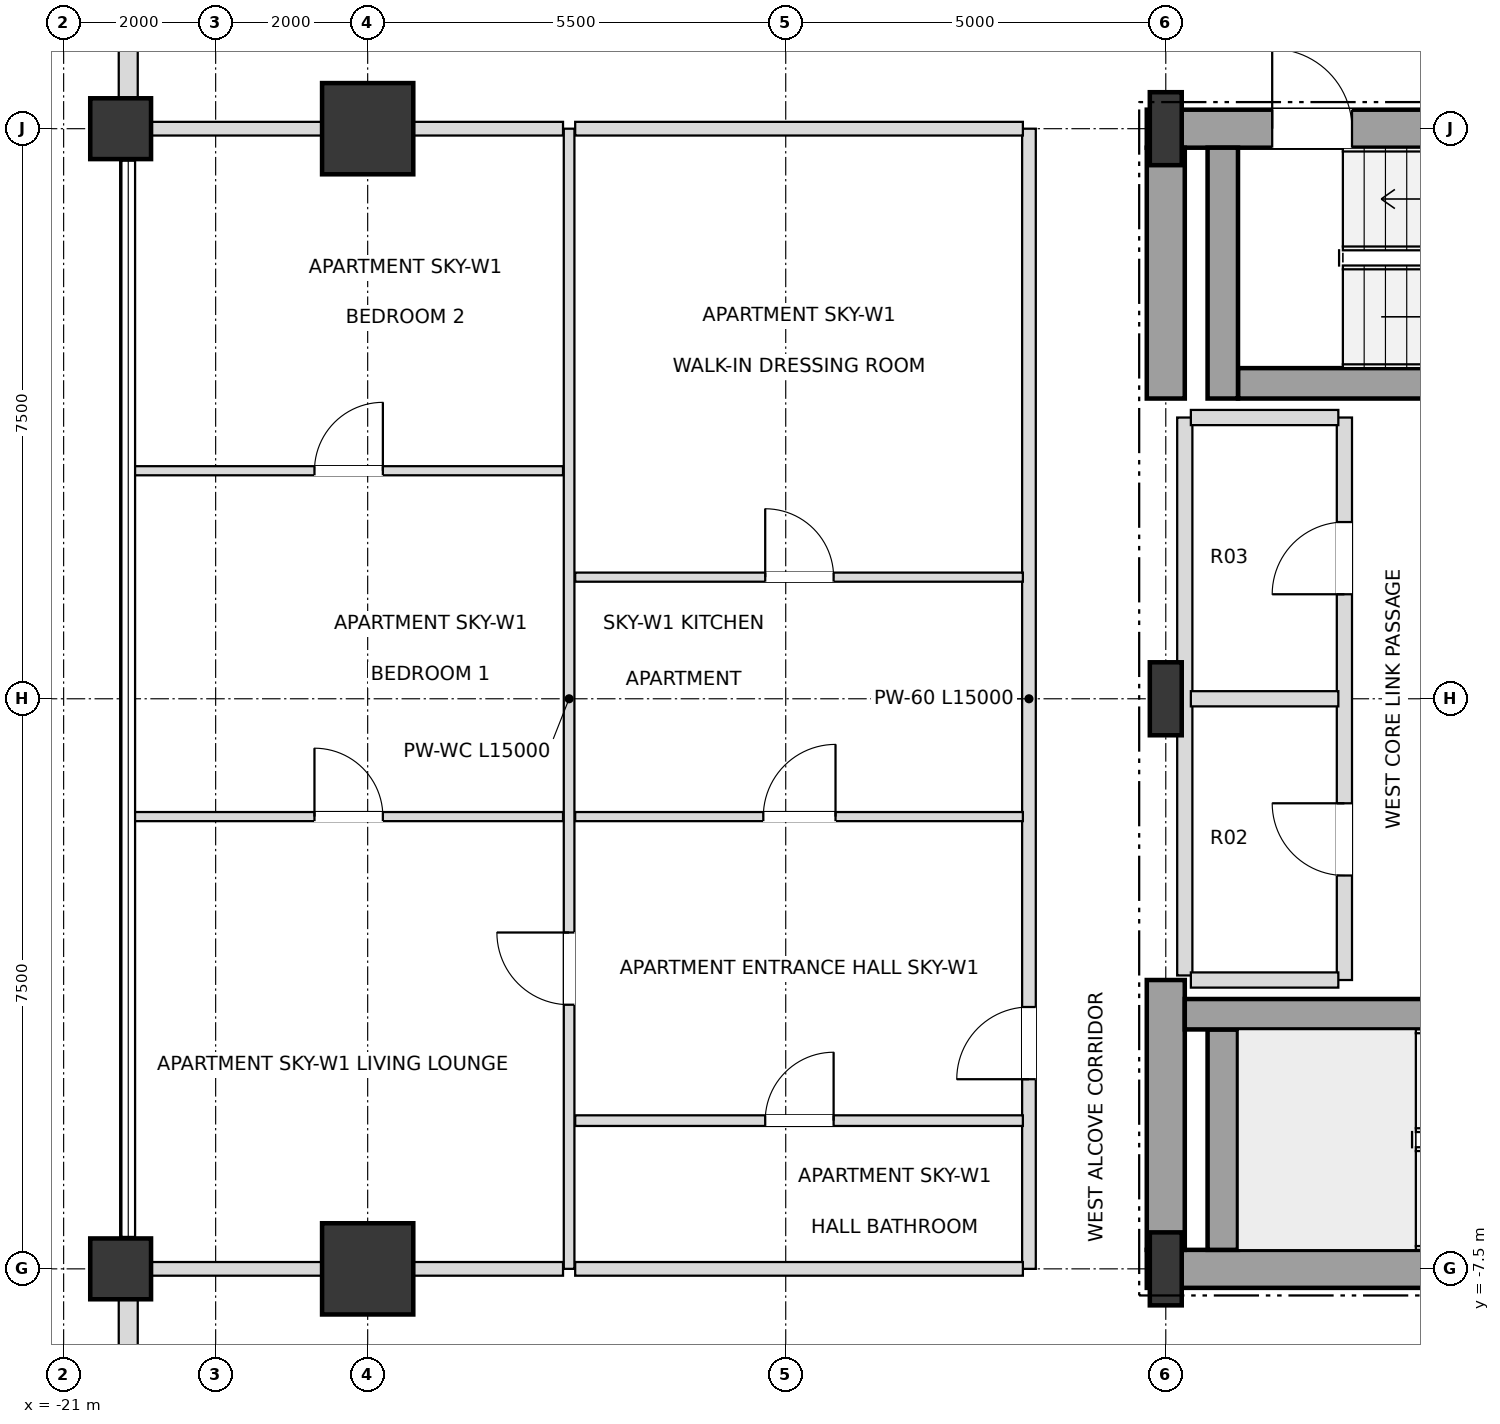
"""IFC4 building model, lengths in metres.
Left out: names, types, materials, properties, quantities, classifications, styles, units other than length and angle.
Written with IfcOpenShell. Run it as: python <this file> out.ifc"""

import sys

from ifc_helpers import new_model, si_unit, direction, frame, frame_2d, origin, origin_2d, place, context, subcontext, project, spatial, rectangle, i_section, extrude, element, fill, save


model = new_model("IFC4")
c1 = context("Model", 3, precision=1e-05, world=origin(), true_north=direction((0.0, 1.0)))
c2 = subcontext(c1, "Body", "Model", "MODEL_VIEW")
j1 = project(units=[si_unit("LENGTHUNIT", "METRE"), si_unit("PLANEANGLEUNIT", "RADIAN")], contexts=[c1])
p1 = place(None, origin())
s1 = spatial("IfcSite", under=j1, at=p1, CompositionType="ELEMENT")
p2 = place(p1, origin())
s2 = spatial("IfcBuilding", under=s1, at=p2, CompositionType="ELEMENT")
p3 = place(p2, frame((0.0, 0.0, 125.1)))
s3 = spatial("IfcBuildingStorey", under=s2, at=p3, CompositionType="ELEMENT", Elevation=125.1)
for number, where, z_axis, x_axis in (
    (1, (-6.5, -7.5, 0.0), (0.0, 0.0, 1.0), (1.0, 0.0, 0.0)),
    (2, (-6.5, 0.0, 0.0), (0.0, 0.0, 1.0), (1.0, 0.0, 0.0)),
    (3, (-6.5, 7.5, 0.0), (0.0, 0.0, 1.0), (1.0, 0.0, 0.0)),
):
    element("IfcColumn", number, at=place(p3, frame(where, z_axis=z_axis, x_axis=x_axis)), inside=s3, PredefinedType="COLUMN", context=c2, shape_type="SweptSolid", body=[
        extrude(i_section(OverallWidth=0.42, OverallDepth=0.96, WebThickness=0.022, FlangeThickness=0.034, at=origin_2d()), origin(), (0.0, 0.0, 1.0), 4.5),
    ])
for number, where, z_axis, x_axis in (
    (4, (-17.0, 7.5, 0.0), (0.0, 0.0, 1.0), (1.0, 0.0, 0.0)),
    (5, (-17.0, -7.5, 0.0), (0.0, 0.0, 1.0), (1.0, 0.0, 0.0)),
):
    element("IfcColumn", number, at=place(p3, frame(where, z_axis=z_axis, x_axis=x_axis)), inside=s3, PredefinedType="USERDEFINED", context=c2, shape_type="SweptSolid", body=[
        extrude(rectangle(XDim=1.2, YDim=1.2, at=origin_2d()), origin(), (0.0, 0.0, 1.0), 4.5),
    ])
for number, where, z_axis, x_axis in (
    (6, (-20.25, -7.5, 0.0), (0.0, 0.0, 1.0), (1.0, 0.0, 0.0)),
    (7, (-20.25, 7.5, 0.0), (0.0, 0.0, 1.0), (1.0, 0.0, 0.0)),
):
    element("IfcColumn", number, at=place(p3, frame(where, z_axis=z_axis, x_axis=x_axis)), inside=s3, PredefinedType="COLUMN", context=c2, shape_type="SweptSolid", body=[
        extrude(rectangle(XDim=0.8, YDim=0.8, at=origin_2d()), origin(), (0.0, 0.0, 1.0), 4.5),
    ])
p4 = place(p3, frame((-20.15, 12.605, 0.0), z_axis=(0.0, 0.0, 1.0), x_axis=(0.0, -1.0, 0.0)))
e8 = element("IfcWall", 8, at=p4, inside=s3, PredefinedType="SOLIDWALL", context=c2, shape_type="SweptSolid", body=[
    extrude(rectangle(XDim=4.71, YDim=0.25, at=frame_2d((2.355, 0.0))), origin(), (0.0, 0.0, 1.0), 3.636),
])
p5 = place(p4, frame((1.455, 0.0, 0.72)))
e9 = element("IfcOpeningElement", 9, at=p5, cuts=e8, PredefinedType="OPENING", context=c2, shape_type="SweptSolid", body=[
    extrude(rectangle(XDim=1.8, YDim=1.68, at=frame_2d((0.9, 0.84))), frame((0.0, 0.135, 0.0), z_axis=(0.0, -1.0, 0.0), x_axis=(1.0, 0.0, 0.0)), (0.0, 0.0, 1.0), 0.27),
])
p6 = place(p3, frame((-20.15, -7.895, 0.0), z_axis=(0.0, 0.0, 1.0), x_axis=(0.0, -1.0, 0.0)))
e10 = element("IfcWall", 10, at=p6, inside=s3, PredefinedType="SOLIDWALL", context=c2, shape_type="SweptSolid", body=[
    extrude(rectangle(XDim=4.71, YDim=0.25, at=frame_2d((2.355, 0.0))), origin(), (0.0, 0.0, 1.0), 3.636),
])
p7 = place(p6, frame((1.455, 0.0, 0.72)))
e11 = element("IfcOpeningElement", 11, at=p7, cuts=e10, PredefinedType="OPENING", context=c2, shape_type="SweptSolid", body=[
    extrude(rectangle(XDim=1.8, YDim=1.68, at=frame_2d((0.9, 0.84))), frame((0.0, 0.135, 0.0), z_axis=(0.0, -1.0, 0.0), x_axis=(1.0, 0.0, 0.0)), (0.0, 0.0, 1.0), 0.27),
])
p8 = place(p3, frame((-6.75, -7.5, 0.0), z_axis=(0.0, 0.0, 1.0), x_axis=(1.0, 0.0, 0.0)))
e12 = element("IfcWall", 12, at=p8, inside=s3, PredefinedType="SHEAR", context=c2, shape_type="SweptSolid", body=[
    extrude(rectangle(XDim=6.75, YDim=0.5, at=frame_2d((3.375, 0.0))), origin(), (0.0, 0.0, 1.0), 4.28),
])
p9 = place(p3, frame((-6.75, 7.5, 0.0), z_axis=(0.0, 0.0, 1.0), x_axis=(1.0, 0.0, 0.0)))
e13 = element("IfcWall", 13, at=p9, inside=s3, PredefinedType="SHEAR", context=c2, shape_type="SweptSolid", body=[
    extrude(rectangle(XDim=6.75, YDim=0.5, at=frame_2d((3.375, 0.0))), origin(), (0.0, 0.0, 1.0), 4.28),
])
p10 = place(p9, frame((1.65, 0.0, 0.0)))
e14 = element("IfcOpeningElement", 14, at=p10, cuts=e13, PredefinedType="OPENING", context=c2, shape_type="SweptSolid", body=[
    extrude(rectangle(XDim=1.05, YDim=2.15, at=frame_2d((0.525, 1.075))), frame((0.0, 0.26, 0.0), z_axis=(0.0, -1.0, 0.0), x_axis=(1.0, 0.0, 0.0)), (0.0, 0.0, 1.0), 0.52),
])
p11 = place(p3, frame((-6.5, -7.25, 0.0), z_axis=(0.0, 0.0, 1.0), x_axis=(0.0, 1.0, 0.0)))
e15 = element("IfcWall", 15, at=p11, inside=s3, PredefinedType="SHEAR", context=c2, shape_type="SweptSolid", body=[
    extrude(rectangle(XDim=3.55, YDim=0.5, at=frame_2d((1.775, 0.0))), origin(), (0.0, 0.0, 1.0), 4.28),
])
p12 = place(p3, frame((-6.5, 3.95, 0.0), z_axis=(0.0, 0.0, 1.0), x_axis=(0.0, 1.0, 0.0)))
e16 = element("IfcWall", 16, at=p12, inside=s3, PredefinedType="SHEAR", context=c2, shape_type="SweptSolid", body=[
    extrude(rectangle(XDim=3.3, YDim=0.5, at=frame_2d((1.65, 0.0))), origin(), (0.0, 0.0, 1.0), 4.28),
])
p13 = place(p3, frame((-5.75, -7.25, 0.0), z_axis=(0.0, 0.0, 1.0), x_axis=(0.0, 1.0, 0.0)))
e17 = element("IfcWall", 17, at=p13, inside=s3, PredefinedType="SHEAR", context=c2, shape_type="SweptSolid", body=[
    extrude(rectangle(XDim=2.9, YDim=0.4, at=frame_2d((1.45, 0.0))), origin(), (0.0, 0.0, 1.0), 4.28),
])
p14 = place(p3, frame((-6.25, -4.15, 0.0), z_axis=(0.0, 0.0, 1.0), x_axis=(1.0, 0.0, 0.0)))
e18 = element("IfcWall", 18, at=p14, inside=s3, PredefinedType="SHEAR", context=c2, shape_type="SweptSolid", body=[
    extrude(rectangle(XDim=7.78, YDim=0.4, at=frame_2d((3.89, 0.0))), origin(), (0.0, 0.0, 1.0), 4.28),
])
p15 = place(p3, frame((-5.55, 4.15, 0.0), z_axis=(0.0, 0.0, 1.0), x_axis=(1.0, 0.0, 0.0)))
e19 = element("IfcWall", 19, at=p15, inside=s3, PredefinedType="SHEAR", context=c2, shape_type="SweptSolid", body=[
    extrude(rectangle(XDim=7.08, YDim=0.4, at=frame_2d((3.54, 0.0))), origin(), (0.0, 0.0, 1.0), 4.28),
])
p16 = place(p3, frame((-5.75, 3.95, 0.0), z_axis=(0.0, 0.0, 1.0), x_axis=(0.0, 1.0, 0.0)))
e20 = element("IfcWall", 20, at=p16, inside=s3, PredefinedType="SHEAR", context=c2, shape_type="SweptSolid", body=[
    extrude(rectangle(XDim=3.3, YDim=0.4, at=frame_2d((1.65, 0.0))), origin(), (0.0, 0.0, 1.0), 4.28),
])
p17 = place(p3, frame((-14.35, -7.5, 0.0), z_axis=(0.0, 0.0, 1.0), x_axis=(0.0, 1.0, 0.0)))
e21 = element("IfcWall", 21, at=p17, inside=s3, PredefinedType="PARTITIONING", context=c2, shape_type="SweptSolid", body=[
    extrude(rectangle(XDim=15.0, YDim=0.14, at=frame_2d((7.5, 0.0))), origin(), (0.0, 0.0, 1.0), 4.28),
])
p18 = place(p17, frame((3.475, 0.0, 0.0)))
e22 = element("IfcOpeningElement", 22, at=p18, cuts=e21, PredefinedType="OPENING", context=c2, shape_type="SweptSolid", body=[
    extrude(rectangle(XDim=0.95, YDim=2.1, at=frame_2d((0.475, 1.05))), frame((0.0, 0.08, 0.0), z_axis=(0.0, -1.0, 0.0), x_axis=(1.0, 0.0, 0.0)), (0.0, 0.0, 1.0), 0.16),
])
p19 = place(p3, frame((-8.3, -7.5, 0.0), z_axis=(0.0, 0.0, 1.0), x_axis=(0.0, 1.0, 0.0)))
e23 = element("IfcWall", 23, at=p19, inside=s3, PredefinedType="PARTITIONING", context=c2, shape_type="SweptSolid", body=[
    extrude(rectangle(XDim=15.0, YDim=0.18, at=frame_2d((7.5, 0.0))), origin(), (0.0, 0.0, 1.0), 4.28),
])
p20 = place(p19, frame((2.495, 0.0, 0.0)))
e24 = element("IfcOpeningElement", 24, at=p20, cuts=e23, PredefinedType="OPENING", context=c2, shape_type="SweptSolid", body=[
    extrude(rectangle(XDim=0.95, YDim=2.15, at=frame_2d((0.475, 1.075))), frame((0.0, 0.1, 0.0), z_axis=(0.0, -1.0, 0.0), x_axis=(1.0, 0.0, 0.0)), (0.0, 0.0, 1.0), 0.2),
])
p21 = place(p3, frame((-6.25, -3.64, 0.0), z_axis=(0.0, 0.0, 1.0), x_axis=(0.0, 1.0, 0.0)))
e25 = element("IfcWall", 25, at=p21, inside=s3, PredefinedType="SOLIDWALL", context=c2, shape_type="SweptSolid", body=[
    extrude(rectangle(XDim=7.34, YDim=0.2, at=frame_2d((3.67, 0.0))), origin(), (0.0, 0.0, 1.0), 4.28),
])
p22 = place(p3, frame((-4.15, -3.7, 0.0), z_axis=(0.0, 0.0, 1.0), x_axis=(0.0, 1.0, 0.0)))
e26 = element("IfcWall", 26, at=p22, inside=s3, PredefinedType="SOLIDWALL", context=c2, shape_type="SweptSolid", body=[
    extrude(rectangle(XDim=7.4, YDim=0.2, at=frame_2d((3.7, 0.0))), origin(), (0.0, 0.0, 1.0), 4.28),
])
p23 = place(p22, frame((1.375, 0.0, 0.0)))
e27 = element("IfcOpeningElement", 27, at=p23, cuts=e26, PredefinedType="OPENING", context=c2, shape_type="SweptSolid", body=[
    extrude(rectangle(XDim=0.95, YDim=2.15, at=frame_2d((0.475, 1.075))), frame((0.0, 0.11, 0.0), z_axis=(0.0, -1.0, 0.0), x_axis=(1.0, 0.0, 0.0)), (0.0, 0.0, 1.0), 0.22),
])
p24 = place(p22, frame((5.075, 0.0, 0.0)))
e28 = element("IfcOpeningElement", 28, at=p24, cuts=e26, PredefinedType="OPENING", context=c2, shape_type="SweptSolid", body=[
    extrude(rectangle(XDim=0.95, YDim=2.15, at=frame_2d((0.475, 1.075))), frame((0.0, 0.11, 0.0), z_axis=(0.0, -1.0, 0.0), x_axis=(1.0, 0.0, 0.0)), (0.0, 0.0, 1.0), 0.22),
])
p25 = place(p3, frame((-20.15, -7.5, 0.0), z_axis=(0.0, 0.0, 1.0), x_axis=(1.0, 0.0, 0.0)))
e29 = element("IfcWall", 29, at=p25, inside=s3, PredefinedType="PARTITIONING", context=c2, shape_type="SweptSolid", body=[
    extrude(rectangle(XDim=5.72, YDim=0.18, at=frame_2d((2.86, 0.0))), origin(), (0.0, 0.0, 1.0), 3.716),
])
p26 = place(p3, frame((-14.27, -7.5, 0.0), z_axis=(0.0, 0.0, 1.0), x_axis=(1.0, 0.0, 0.0)))
e30 = element("IfcWall", 30, at=p26, inside=s3, PredefinedType="PARTITIONING", context=c2, shape_type="SweptSolid", body=[
    extrude(rectangle(XDim=5.89, YDim=0.18, at=frame_2d((2.945, 0.0))), origin(), (0.0, 0.0, 1.0), 3.716),
])
p27 = place(p3, frame((-14.27, -5.55, 0.0), z_axis=(0.0, 0.0, 1.0), x_axis=(1.0, 0.0, 0.0)))
e31 = element("IfcWall", 31, at=p27, inside=s3, PredefinedType="PARTITIONING", context=c2, shape_type="SweptSolid", body=[
    extrude(rectangle(XDim=5.89, YDim=0.14, at=frame_2d((2.945, 0.0))), origin(), (0.0, 0.0, 1.0), 4.28),
])
p28 = place(p27, frame((2.5, 0.0, 0.0)))
e32 = element("IfcOpeningElement", 32, at=p28, cuts=e31, PredefinedType="OPENING", context=c2, shape_type="SweptSolid", body=[
    extrude(rectangle(XDim=0.9, YDim=2.1, at=frame_2d((0.45, 1.05))), frame((0.0, 0.08, 0.0), z_axis=(0.0, -1.0, 0.0), x_axis=(1.0, 0.0, 0.0)), (0.0, 0.0, 1.0), 0.16),
])
p29 = place(p3, frame((-6.17, -3.7, 0.0), z_axis=(0.0, 0.0, 1.0), x_axis=(1.0, 0.0, 0.0)))
e33 = element("IfcWall", 33, at=p29, inside=s3, PredefinedType="SOLIDWALL", context=c2, shape_type="SweptSolid", body=[
    extrude(rectangle(XDim=1.94, YDim=0.2, at=frame_2d((0.97, 0.0))), origin(), (0.0, 0.0, 1.0), 4.28),
])
p30 = place(p3, frame((-20.07, -1.55, 0.0), z_axis=(0.0, 0.0, 1.0), x_axis=(1.0, 0.0, 0.0)))
e34 = element("IfcWall", 34, at=p30, inside=s3, PredefinedType="PARTITIONING", context=c2, shape_type="SweptSolid", body=[
    extrude(rectangle(XDim=5.64, YDim=0.12, at=frame_2d((2.82, 0.0))), origin(), (0.0, 0.0, 1.0), 3.716),
])
p31 = place(p30, frame((2.37, 0.0, 0.0)))
e35 = element("IfcOpeningElement", 35, at=p31, cuts=e34, PredefinedType="OPENING", context=c2, shape_type="SweptSolid", body=[
    extrude(rectangle(XDim=0.9, YDim=2.1, at=frame_2d((0.45, 1.05))), frame((0.0, 0.07, 0.0), z_axis=(0.0, -1.0, 0.0), x_axis=(1.0, 0.0, 0.0)), (0.0, 0.0, 1.0), 0.14),
])
p32 = place(p3, frame((-14.27, -1.55, 0.0), z_axis=(0.0, 0.0, 1.0), x_axis=(1.0, 0.0, 0.0)))
e36 = element("IfcWall", 36, at=p32, inside=s3, PredefinedType="PARTITIONING", context=c2, shape_type="SweptSolid", body=[
    extrude(rectangle(XDim=5.89, YDim=0.12, at=frame_2d((2.945, 0.0))), origin(), (0.0, 0.0, 1.0), 4.28),
])
p33 = place(p32, frame((2.475, 0.0, 0.0)))
e37 = element("IfcOpeningElement", 37, at=p33, cuts=e36, PredefinedType="OPENING", context=c2, shape_type="SweptSolid", body=[
    extrude(rectangle(XDim=0.95, YDim=2.1, at=frame_2d((0.475, 1.05))), frame((0.0, 0.07, 0.0), z_axis=(0.0, -1.0, 0.0), x_axis=(1.0, 0.0, 0.0)), (0.0, 0.0, 1.0), 0.14),
])
p34 = place(p3, frame((-6.17, 0.0, 0.0), z_axis=(0.0, 0.0, 1.0), x_axis=(1.0, 0.0, 0.0)))
e38 = element("IfcWall", 38, at=p34, inside=s3, PredefinedType="SOLIDWALL", context=c2, shape_type="SweptSolid", body=[
    extrude(rectangle(XDim=1.94, YDim=0.2, at=frame_2d((0.97, 0.0))), origin(), (0.0, 0.0, 1.0), 4.28),
])
p35 = place(p3, frame((-14.27, 1.6, 0.0), z_axis=(0.0, 0.0, 1.0), x_axis=(1.0, 0.0, 0.0)))
e39 = element("IfcWall", 39, at=p35, inside=s3, PredefinedType="PARTITIONING", context=c2, shape_type="SweptSolid", body=[
    extrude(rectangle(XDim=5.89, YDim=0.12, at=frame_2d((2.945, 0.0))), origin(), (0.0, 0.0, 1.0), 4.28),
])
p36 = place(p35, frame((2.5, 0.0, 0.0)))
e40 = element("IfcOpeningElement", 40, at=p36, cuts=e39, PredefinedType="OPENING", context=c2, shape_type="SweptSolid", body=[
    extrude(rectangle(XDim=0.9, YDim=2.1, at=frame_2d((0.45, 1.05))), frame((0.0, 0.07, 0.0), z_axis=(0.0, -1.0, 0.0), x_axis=(1.0, 0.0, 0.0)), (0.0, 0.0, 1.0), 0.14),
])
p37 = place(p3, frame((-20.07, 3.0, 0.0), z_axis=(0.0, 0.0, 1.0), x_axis=(1.0, 0.0, 0.0)))
e41 = element("IfcWall", 41, at=p37, inside=s3, PredefinedType="PARTITIONING", context=c2, shape_type="SweptSolid", body=[
    extrude(rectangle(XDim=5.64, YDim=0.12, at=frame_2d((2.82, 0.0))), origin(), (0.0, 0.0, 1.0), 3.716),
])
p38 = place(p37, frame((2.37, 0.0, 0.0)))
e42 = element("IfcOpeningElement", 42, at=p38, cuts=e41, PredefinedType="OPENING", context=c2, shape_type="SweptSolid", body=[
    extrude(rectangle(XDim=0.9, YDim=2.1, at=frame_2d((0.45, 1.05))), frame((0.0, 0.07, 0.0), z_axis=(0.0, -1.0, 0.0), x_axis=(1.0, 0.0, 0.0)), (0.0, 0.0, 1.0), 0.14),
])
p39 = place(p3, frame((-6.17, 3.7, 0.0), z_axis=(0.0, 0.0, 1.0), x_axis=(1.0, 0.0, 0.0)))
e43 = element("IfcWall", 43, at=p39, inside=s3, PredefinedType="SOLIDWALL", context=c2, shape_type="SweptSolid", body=[
    extrude(rectangle(XDim=1.94, YDim=0.2, at=frame_2d((0.97, 0.0))), origin(), (0.0, 0.0, 1.0), 4.28),
])
p40 = place(p3, frame((-20.15, 7.5, 0.0), z_axis=(0.0, 0.0, 1.0), x_axis=(1.0, 0.0, 0.0)))
e44 = element("IfcWall", 44, at=p40, inside=s3, PredefinedType="PARTITIONING", context=c2, shape_type="SweptSolid", body=[
    extrude(rectangle(XDim=5.72, YDim=0.18, at=frame_2d((2.86, 0.0))), origin(), (0.0, 0.0, 1.0), 3.716),
])
p41 = place(p3, frame((-14.27, 7.5, 0.0), z_axis=(0.0, 0.0, 1.0), x_axis=(1.0, 0.0, 0.0)))
e45 = element("IfcWall", 45, at=p41, inside=s3, PredefinedType="PARTITIONING", context=c2, shape_type="SweptSolid", body=[
    extrude(rectangle(XDim=5.89, YDim=0.18, at=frame_2d((2.945, 0.0))), origin(), (0.0, 0.0, 1.0), 3.716),
])
p42 = place(p10, origin())
e46 = element("IfcDoor", 46, at=p42, inside=s3, OperationType="SINGLE_SWING_LEFT", PredefinedType="DOOR", context=c2, shape_type="SweptSolid", body=[
    extrude(rectangle(XDim=1.05, YDim=2.15, at=frame_2d((0.525, 1.075))), frame((0.0, 0.025, 0.0), z_axis=(0.0, -1.0, 0.0), x_axis=(1.0, 0.0, 0.0)), (0.0, 0.0, 1.0), 0.05),
])
fill(e14, e46)
p43 = place(p23, origin())
e47 = element("IfcDoor", 47, at=p43, inside=s3, OperationType="SINGLE_SWING_RIGHT", PredefinedType="DOOR", context=c2, shape_type="SweptSolid", body=[
    extrude(rectangle(XDim=0.95, YDim=2.15, at=frame_2d((0.475, 1.075))), frame((0.0, 0.025, 0.0), z_axis=(0.0, -1.0, 0.0), x_axis=(1.0, 0.0, 0.0)), (0.0, 0.0, 1.0), 0.05),
])
fill(e27, e47)
p44 = place(p24, origin())
e48 = element("IfcDoor", 48, at=p44, inside=s3, OperationType="SINGLE_SWING_LEFT", PredefinedType="DOOR", context=c2, shape_type="SweptSolid", body=[
    extrude(rectangle(XDim=0.95, YDim=2.15, at=frame_2d((0.475, 1.075))), frame((0.0, 0.025, 0.0), z_axis=(0.0, -1.0, 0.0), x_axis=(1.0, 0.0, 0.0)), (0.0, 0.0, 1.0), 0.05),
])
fill(e28, e48)
p45 = place(p28, origin())
e49 = element("IfcDoor", 49, at=p45, inside=s3, OperationType="SINGLE_SWING_RIGHT", PredefinedType="DOOR", context=c2, shape_type="SweptSolid", body=[
    extrude(rectangle(XDim=0.9, YDim=2.1, at=frame_2d((0.45, 1.05))), frame((0.0, 0.025, 0.0), z_axis=(0.0, -1.0, 0.0), x_axis=(1.0, 0.0, 0.0)), (0.0, 0.0, 1.0), 0.05),
])
fill(e32, e49)
p46 = place(p20, origin())
e50 = element("IfcDoor", 50, at=p46, inside=s3, OperationType="SINGLE_SWING_LEFT", PredefinedType="DOOR", context=c2, shape_type="SweptSolid", body=[
    extrude(rectangle(XDim=0.95, YDim=2.15, at=frame_2d((0.475, 1.075))), frame((0.0, 0.025, 0.0), z_axis=(0.0, -1.0, 0.0), x_axis=(1.0, 0.0, 0.0)), (0.0, 0.0, 1.0), 0.05),
])
fill(e24, e50)
p47 = place(p33, origin())
e51 = element("IfcDoor", 51, at=p47, inside=s3, OperationType="SINGLE_SWING_RIGHT", PredefinedType="DOOR", context=c2, shape_type="SweptSolid", body=[
    extrude(rectangle(XDim=0.95, YDim=2.1, at=frame_2d((0.475, 1.05))), frame((0.0, 0.025, 0.0), z_axis=(0.0, -1.0, 0.0), x_axis=(1.0, 0.0, 0.0)), (0.0, 0.0, 1.0), 0.05),
])
fill(e37, e51)
p48 = place(p36, origin())
e52 = element("IfcDoor", 52, at=p48, inside=s3, OperationType="SINGLE_SWING_LEFT", PredefinedType="DOOR", context=c2, shape_type="SweptSolid", body=[
    extrude(rectangle(XDim=0.9, YDim=2.1, at=frame_2d((0.45, 1.05))), frame((0.0, 0.025, 0.0), z_axis=(0.0, -1.0, 0.0), x_axis=(1.0, 0.0, 0.0)), (0.0, 0.0, 1.0), 0.05),
])
fill(e40, e52)
p49 = place(p18, origin())
e53 = element("IfcDoor", 53, at=p49, inside=s3, OperationType="SINGLE_SWING_RIGHT", PredefinedType="DOOR", context=c2, shape_type="SweptSolid", body=[
    extrude(rectangle(XDim=0.95, YDim=2.1, at=frame_2d((0.475, 1.05))), frame((0.0, 0.025, 0.0), z_axis=(0.0, -1.0, 0.0), x_axis=(1.0, 0.0, 0.0)), (0.0, 0.0, 1.0), 0.05),
])
fill(e22, e53)
p50 = place(p31, origin())
e54 = element("IfcDoor", 54, at=p50, inside=s3, OperationType="SINGLE_SWING_LEFT", PredefinedType="DOOR", context=c2, shape_type="SweptSolid", body=[
    extrude(rectangle(XDim=0.9, YDim=2.1, at=frame_2d((0.45, 1.05))), frame((0.0, 0.025, 0.0), z_axis=(0.0, -1.0, 0.0), x_axis=(1.0, 0.0, 0.0)), (0.0, 0.0, 1.0), 0.05),
])
fill(e35, e54)
p51 = place(p38, origin())
e55 = element("IfcDoor", 55, at=p51, inside=s3, OperationType="SINGLE_SWING_RIGHT", PredefinedType="DOOR", context=c2, shape_type="SweptSolid", body=[
    extrude(rectangle(XDim=0.9, YDim=2.1, at=frame_2d((0.45, 1.05))), frame((0.0, 0.025, 0.0), z_axis=(0.0, -1.0, 0.0), x_axis=(1.0, 0.0, 0.0)), (0.0, 0.0, 1.0), 0.05),
])
fill(e42, e55)
save(model, sys.argv[1])
